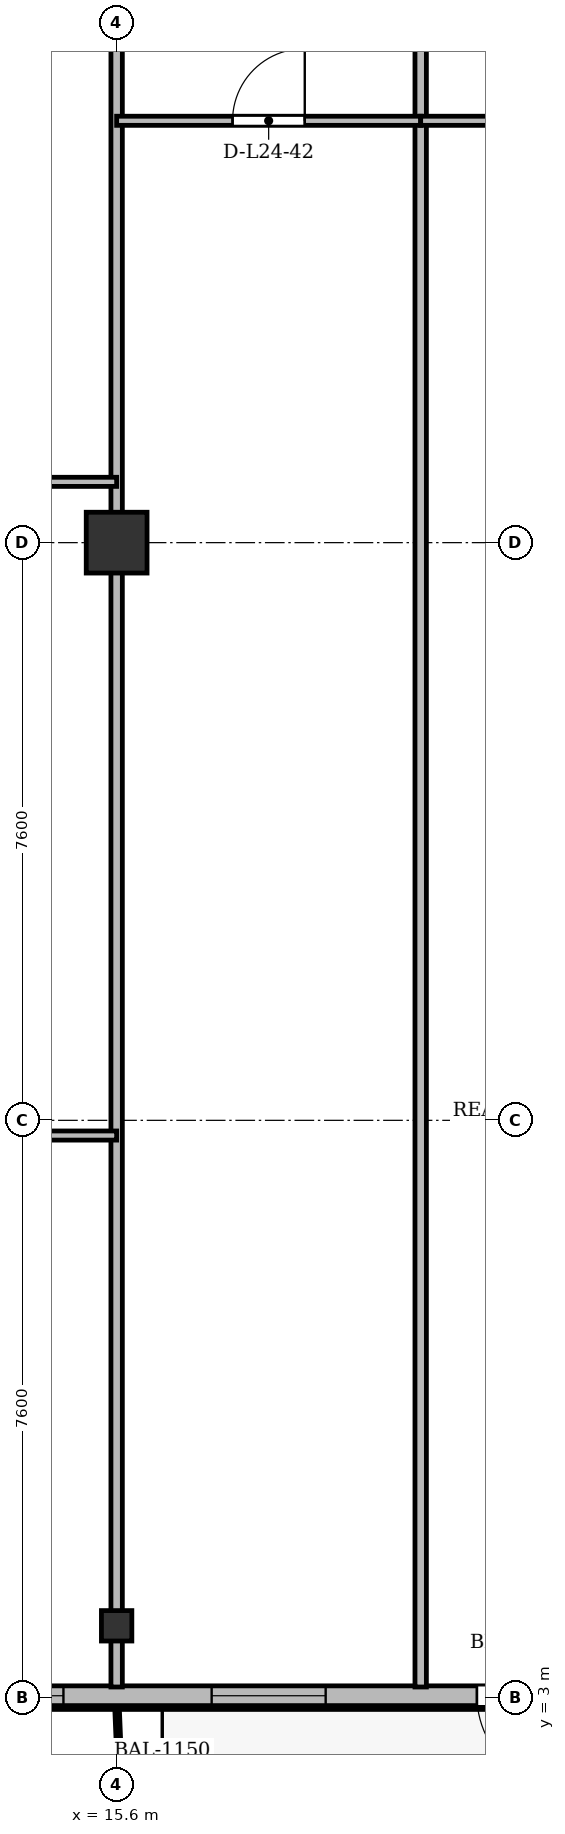
"""IFC4 building model, lengths in metres.
Left out: names, types, materials, properties, quantities, classifications, styles, units other than length and angle.
Written with IfcOpenShell. Run it as: python <this file> out.ifc"""

import sys

from ifc_helpers import new_model, si_unit, direction, frame, frame_2d, origin, origin_2d, place, context, subcontext, project, spatial, rectangle, i_section, extrude, source, transform, mapped, element, fill, save


model = new_model("IFC4")
c1 = context("Model", 3, precision=1e-05, world=origin(), true_north=direction((0.0, 1.0)))
c2 = subcontext(c1, "Body", "Model", "MODEL_VIEW")
j1 = project(units=[si_unit("LENGTHUNIT", "METRE"), si_unit("PLANEANGLEUNIT", "RADIAN")], contexts=[c1])
p1 = place(None, origin())
s1 = spatial("IfcSite", under=j1, at=p1, CompositionType="ELEMENT")
p2 = place(p1, origin())
s2 = spatial("IfcBuilding", under=s1, at=p2, CompositionType="ELEMENT")
p3 = place(p2, frame((0.0, 0.0, 96.1)))
s3 = spatial("IfcBuildingStorey", under=s2, at=p3, CompositionType="ELEMENT", Elevation=96.1)
m1 = source(origin(), c2, "Body", "SweptSolid", [
    extrude(i_section(OverallWidth=0.4, OverallDepth=0.4, WebThickness=0.022, FlangeThickness=0.035, at=origin_2d()), origin(), (0.0, 0.0, 1.0), 3.6),
])
p4 = place(p3, frame((15.6, 3.95, 0.0), z_axis=(0.0, 0.0, 1.0), x_axis=(1.0, 0.0, 0.0)))
e1 = element("IfcColumn", 1, at=p4, inside=s3, PredefinedType="COLUMN", context=c2, shape_type="MappedRepresentation", body=[
    mapped(m1, transform((0.0, 0.0, 0.0), x_axis=(1.0, 0.0, 0.0), y_axis=(0.0, 1.0, 0.0), z_axis=(0.0, 0.0, 1.0), scale=1.0)),
])
m2 = source(origin(), c2, "Body", "SweptSolid", [
    extrude(rectangle(XDim=0.8, YDim=0.8, at=origin_2d()), origin(), (0.0, 0.0, 1.0), 3.6),
])
p5 = place(p3, frame((15.6, 18.2, 0.0), z_axis=(0.0, 0.0, 1.0), x_axis=(1.0, 0.0, 0.0)))
e2 = element("IfcColumn", 2, at=p5, inside=s3, PredefinedType="COLUMN", context=c2, shape_type="MappedRepresentation", body=[
    mapped(m2, transform((0.0, 0.0, 0.0), x_axis=(1.0, 0.0, 0.0), y_axis=(0.0, 1.0, 0.0), z_axis=(0.0, 0.0, 1.0), scale=1.0)),
])
p6 = place(p3, frame((66.9, 3.03, 0.0), z_axis=(0.0, 0.0, 1.0), x_axis=(-1.0, 0.0, 0.0)))
e3 = element("IfcWall", 3, at=p6, inside=s3, PredefinedType="SOLIDWALL", context=c2, shape_type="SweptSolid", body=[
    extrude(rectangle(XDim=59.4, YDim=0.26, at=frame_2d((29.7, 0.0))), origin(), (0.0, 0.0, 1.0), 3.34),
])
p7 = place(p6, frame((2.1, 0.0, 0.9)))
e4 = element("IfcOpeningElement", 4, at=p7, cuts=e3, PredefinedType="OPENING", context=c2, shape_type="SweptSolid", body=[
    extrude(rectangle(XDim=1.8, YDim=1.8, at=frame_2d((0.9, 0.9))), frame((0.0, 0.14, 0.0), z_axis=(0.0, -1.0, 0.0), x_axis=(1.0, 0.0, 0.0)), (0.0, 0.0, 1.0), 0.28),
])
p8 = place(p6, frame((5.3, 0.0, 0.9)))
e5 = element("IfcOpeningElement", 5, at=p8, cuts=e3, PredefinedType="OPENING", context=c2, shape_type="SweptSolid", body=[
    extrude(rectangle(XDim=2.2, YDim=1.8, at=frame_2d((1.1, 0.9))), frame((0.0, 0.14, 0.0), z_axis=(0.0, -1.0, 0.0), x_axis=(1.0, 0.0, 0.0)), (0.0, 0.0, 1.0), 0.28),
])
p9 = place(p6, frame((8.65, 0.0, 0.9)))
e6 = element("IfcOpeningElement", 6, at=p9, cuts=e3, PredefinedType="OPENING", context=c2, shape_type="SweptSolid", body=[
    extrude(rectangle(XDim=1.5, YDim=1.75, at=frame_2d((0.75, 0.875))), frame((0.0, 0.14, 0.0), z_axis=(0.0, -1.0, 0.0), x_axis=(1.0, 0.0, 0.0)), (0.0, 0.0, 1.0), 0.28),
])
p10 = place(p6, frame((11.0, 0.0, 0.9)))
e7 = element("IfcOpeningElement", 7, at=p10, cuts=e3, PredefinedType="OPENING", context=c2, shape_type="SweptSolid", body=[
    extrude(rectangle(XDim=2.0, YDim=1.95, at=frame_2d((1.0, 0.975))), frame((0.0, 0.14, 0.0), z_axis=(0.0, -1.0, 0.0), x_axis=(1.0, 0.0, 0.0)), (0.0, 0.0, 1.0), 0.28),
])
p11 = place(p6, frame((13.775, 0.0, 0.9)))
e8 = element("IfcOpeningElement", 8, at=p11, cuts=e3, PredefinedType="OPENING", context=c2, shape_type="SweptSolid", body=[
    extrude(rectangle(XDim=1.65, YDim=1.85, at=frame_2d((0.825, 0.925))), frame((0.0, 0.14, 0.0), z_axis=(0.0, -1.0, 0.0), x_axis=(1.0, 0.0, 0.0)), (0.0, 0.0, 1.0), 0.28),
])
p12 = place(p6, frame((16.7, 0.0, 0.9)))
e9 = element("IfcOpeningElement", 9, at=p12, cuts=e3, PredefinedType="OPENING", context=c2, shape_type="SweptSolid", body=[
    extrude(rectangle(XDim=1.8, YDim=1.8, at=frame_2d((0.9, 0.9))), frame((0.0, 0.14, 0.0), z_axis=(0.0, -1.0, 0.0), x_axis=(1.0, 0.0, 0.0)), (0.0, 0.0, 1.0), 0.28),
])
p13 = place(p6, frame((20.227, 0.0, 0.0)))
e10 = element("IfcOpeningElement", 10, at=p13, cuts=e3, PredefinedType="OPENING", context=c2, shape_type="SweptSolid", body=[
    extrude(rectangle(XDim=1.2, YDim=2.2, at=frame_2d((0.6, 1.1))), frame((0.0, 0.14, 0.0), z_axis=(0.0, -1.0, 0.0), x_axis=(1.0, 0.0, 0.0)), (0.0, 0.0, 1.0), 0.28),
])
p14 = place(p6, frame((28.95, 0.0, 0.9)))
e11 = element("IfcOpeningElement", 11, at=p14, cuts=e3, PredefinedType="OPENING", context=c2, shape_type="SweptSolid", body=[
    extrude(rectangle(XDim=1.5, YDim=1.75, at=frame_2d((0.75, 0.875))), frame((0.0, 0.14, 0.0), z_axis=(0.0, -1.0, 0.0), x_axis=(1.0, 0.0, 0.0)), (0.0, 0.0, 1.0), 0.28),
])
p15 = place(p6, frame((36.5, 0.0, 0.9)))
e12 = element("IfcOpeningElement", 12, at=p15, cuts=e3, PredefinedType="OPENING", context=c2, shape_type="SweptSolid", body=[
    extrude(rectangle(XDim=2.0, YDim=1.95, at=frame_2d((1.0, 0.975))), frame((0.0, 0.14, 0.0), z_axis=(0.0, -1.0, 0.0), x_axis=(1.0, 0.0, 0.0)), (0.0, 0.0, 1.0), 0.28),
])
p16 = place(p6, frame((39.075, 0.0, 0.9)))
e13 = element("IfcOpeningElement", 13, at=p16, cuts=e3, PredefinedType="OPENING", context=c2, shape_type="SweptSolid", body=[
    extrude(rectangle(XDim=1.65, YDim=1.85, at=frame_2d((0.825, 0.925))), frame((0.0, 0.14, 0.0), z_axis=(0.0, -1.0, 0.0), x_axis=(1.0, 0.0, 0.0)), (0.0, 0.0, 1.0), 0.28),
])
p17 = place(p6, frame((41.4, 0.0, 0.9)))
e14 = element("IfcOpeningElement", 14, at=p17, cuts=e3, PredefinedType="OPENING", context=c2, shape_type="SweptSolid", body=[
    extrude(rectangle(XDim=1.8, YDim=1.8, at=frame_2d((0.9, 0.9))), frame((0.0, 0.14, 0.0), z_axis=(0.0, -1.0, 0.0), x_axis=(1.0, 0.0, 0.0)), (0.0, 0.0, 1.0), 0.28),
])
p18 = place(p6, frame((45.36, 0.0, 0.0)))
e15 = element("IfcOpeningElement", 15, at=p18, cuts=e3, PredefinedType="OPENING", context=c2, shape_type="SweptSolid", body=[
    extrude(rectangle(XDim=1.2, YDim=2.2, at=frame_2d((0.6, 1.1))), frame((0.0, 0.14, 0.0), z_axis=(0.0, -1.0, 0.0), x_axis=(1.0, 0.0, 0.0)), (0.0, 0.0, 1.0), 0.28),
])
p19 = place(p6, frame((48.55, 0.0, 0.9)))
e16 = element("IfcOpeningElement", 16, at=p19, cuts=e3, PredefinedType="OPENING", context=c2, shape_type="SweptSolid", body=[
    extrude(rectangle(XDim=1.5, YDim=1.75, at=frame_2d((0.75, 0.875))), frame((0.0, 0.14, 0.0), z_axis=(0.0, -1.0, 0.0), x_axis=(1.0, 0.0, 0.0)), (0.0, 0.0, 1.0), 0.28),
])
p20 = place(p6, frame((52.0, 0.0, 0.9)))
e17 = element("IfcOpeningElement", 17, at=p20, cuts=e3, PredefinedType="OPENING", context=c2, shape_type="SweptSolid", body=[
    extrude(rectangle(XDim=2.0, YDim=1.95, at=frame_2d((1.0, 0.975))), frame((0.0, 0.14, 0.0), z_axis=(0.0, -1.0, 0.0), x_axis=(1.0, 0.0, 0.0)), (0.0, 0.0, 1.0), 0.28),
])
p21 = place(p6, frame((55.575, 0.0, 0.9)))
e18 = element("IfcOpeningElement", 18, at=p21, cuts=e3, PredefinedType="OPENING", context=c2, shape_type="SweptSolid", body=[
    extrude(rectangle(XDim=1.65, YDim=1.85, at=frame_2d((0.825, 0.925))), frame((0.0, 0.14, 0.0), z_axis=(0.0, -1.0, 0.0), x_axis=(1.0, 0.0, 0.0)), (0.0, 0.0, 1.0), 0.28),
])
p22 = place(p3, frame((15.6, 3.145, 0.0), z_axis=(0.0, 0.0, 1.0), x_axis=(0.0, 1.0, 0.0)))
e19 = element("IfcWall", 19, at=p22, inside=s3, PredefinedType="PARTITIONING", context=c2, shape_type="SweptSolid", body=[
    extrude(rectangle(XDim=24.455, YDim=0.15, at=frame_2d((12.228, 0.0))), origin(), (0.0, 0.0, 1.0), 2.84),
])
p23 = place(p3, frame((19.6, 3.145, 0.0), z_axis=(0.0, 0.0, 1.0), x_axis=(0.0, 1.0, 0.0)))
e20 = element("IfcWall", 20, at=p23, inside=s3, PredefinedType="PARTITIONING", context=c2, shape_type="SweptSolid", body=[
    extrude(rectangle(XDim=24.455, YDim=0.15, at=frame_2d((12.228, 0.0))), origin(), (0.0, 0.0, 1.0), 2.752),
])
p24 = place(p3, frame((8.8, 19.0, 0.0), z_axis=(0.0, 0.0, 1.0), x_axis=(1.0, 0.0, 0.0)))
e21 = element("IfcWall", 21, at=p24, inside=s3, PredefinedType="PARTITIONING", context=c2, shape_type="SweptSolid", body=[
    extrude(rectangle(XDim=6.8, YDim=0.12, at=frame_2d((3.4, 0.0))), origin(), (0.0, 0.0, 1.0), 2.84),
])
p25 = place(p24, frame((2.925, 0.0, 0.0)))
e22 = element("IfcOpeningElement", 22, at=p25, cuts=e21, PredefinedType="OPENING", context=c2, shape_type="SweptSolid", body=[
    extrude(rectangle(XDim=0.95, YDim=2.15, at=frame_2d((0.475, 1.075))), frame((0.0, 0.07, 0.0), z_axis=(0.0, -1.0, 0.0), x_axis=(1.0, 0.0, 0.0)), (0.0, 0.0, 1.0), 0.14),
])
p26 = place(p3, frame((12.2, 10.4, 0.0), z_axis=(0.0, 0.0, 1.0), x_axis=(1.0, 0.0, 0.0)))
e23 = element("IfcWall", 23, at=p26, inside=s3, PredefinedType="PARTITIONING", context=c2, shape_type="SweptSolid", body=[
    extrude(rectangle(XDim=3.4, YDim=0.12, at=frame_2d((1.7, 0.0))), origin(), (0.0, 0.0, 1.0), 2.84),
])
p27 = place(p26, frame((1.131, 0.0, 0.0)))
e24 = element("IfcOpeningElement", 24, at=p27, cuts=e23, PredefinedType="OPENING", context=c2, shape_type="SweptSolid", body=[
    extrude(rectangle(XDim=0.95, YDim=2.15, at=frame_2d((0.475, 1.075))), frame((0.0, 0.07, 0.0), z_axis=(0.0, -1.0, 0.0), x_axis=(1.0, 0.0, 0.0)), (0.0, 0.0, 1.0), 0.14),
])
p28 = place(p3, frame((15.6, 23.75, 0.0), z_axis=(0.0, 0.0, 1.0), x_axis=(1.0, 0.0, 0.0)))
e25 = element("IfcWall", 25, at=p28, inside=s3, PredefinedType="PARTITIONING", context=c2, shape_type="SweptSolid", body=[
    extrude(rectangle(XDim=4.0, YDim=0.12, at=frame_2d((2.0, 0.0))), origin(), (0.0, 0.0, 1.0), 2.84),
])
p29 = place(p28, frame((1.525, 0.0, 0.0)))
e26 = element("IfcOpeningElement", 26, at=p29, cuts=e25, PredefinedType="OPENING", context=c2, shape_type="SweptSolid", body=[
    extrude(rectangle(XDim=0.95, YDim=2.15, at=frame_2d((0.475, 1.075))), frame((0.0, 0.07, 0.0), z_axis=(0.0, -1.0, 0.0), x_axis=(1.0, 0.0, 0.0)), (0.0, 0.0, 1.0), 0.14),
])
p30 = place(p3, frame((19.6, 23.75, 0.0), z_axis=(0.0, 0.0, 1.0), x_axis=(1.0, 0.0, 0.0)))
e27 = element("IfcWall", 27, at=p30, inside=s3, PredefinedType="PARTITIONING", context=c2, shape_type="SweptSolid", body=[
    extrude(rectangle(XDim=3.8, YDim=0.12, at=frame_2d((1.9, 0.0))), origin(), (0.0, 0.0, 1.0), 2.84),
])
p31 = place(p30, frame((1.33, 0.0, 0.0)))
e28 = element("IfcOpeningElement", 28, at=p31, cuts=e27, PredefinedType="OPENING", context=c2, shape_type="SweptSolid", body=[
    extrude(rectangle(XDim=0.95, YDim=2.15, at=frame_2d((0.475, 1.075))), frame((0.0, 0.07, 0.0), z_axis=(0.0, -1.0, 0.0), x_axis=(1.0, 0.0, 0.0)), (0.0, 0.0, 1.0), 0.14),
])
m3 = source(origin(), c2, "Body", "SweptSolid", [
    extrude(rectangle(XDim=1.2, YDim=2.2, at=frame_2d((0.6, 1.1))), frame((0.0, 0.025, 0.0), z_axis=(0.0, -1.0, 0.0), x_axis=(1.0, 0.0, 0.0)), (0.0, 0.0, 1.0), 0.05),
])
p32 = place(p18, origin())
e29 = element("IfcDoor", 29, at=p32, inside=s3, OperationType="SINGLE_SWING_LEFT", PredefinedType="DOOR", context=c2, shape_type="MappedRepresentation", body=[
    mapped(m3, transform((0.0, 0.0, 0.0), x_axis=(1.0, 0.0, 0.0), y_axis=(0.0, 1.0, 0.0), z_axis=(0.0, 0.0, 1.0), scale=1.0)),
])
fill(e15, e29)
m4 = source(origin(), c2, "Body", "SweptSolid", [
    extrude(rectangle(XDim=1.5, YDim=1.75, at=frame_2d((0.75, 0.875))), frame((0.0, 0.03, 0.0), z_axis=(0.0, -1.0, 0.0), x_axis=(1.0, 0.0, 0.0)), (0.0, 0.0, 1.0), 0.06),
])
p33 = place(p19, origin())
e30 = element("IfcWindow", 30, at=p33, inside=s3, PartitioningType="SINGLE_PANEL", PredefinedType="WINDOW", context=c2, shape_type="MappedRepresentation", body=[
    mapped(m4, transform((0.0, 0.0, 0.0), x_axis=(1.0, 0.0, 0.0), y_axis=(0.0, 1.0, 0.0), z_axis=(0.0, 0.0, 1.0), scale=1.0)),
])
fill(e16, e30)
m5 = source(origin(), c2, "Body", "SweptSolid", [
    extrude(rectangle(XDim=2.0, YDim=1.95, at=frame_2d((1.0, 0.975))), frame((0.0, 0.03, 0.0), z_axis=(0.0, -1.0, 0.0), x_axis=(1.0, 0.0, 0.0)), (0.0, 0.0, 1.0), 0.06),
])
p34 = place(p20, origin())
e31 = element("IfcWindow", 31, at=p34, inside=s3, PartitioningType="SINGLE_PANEL", PredefinedType="WINDOW", context=c2, shape_type="MappedRepresentation", body=[
    mapped(m5, transform((0.0, 0.0, 0.0), x_axis=(1.0, 0.0, 0.0), y_axis=(0.0, 1.0, 0.0), z_axis=(0.0, 0.0, 1.0), scale=1.0)),
])
fill(e17, e31)
m6 = source(origin(), c2, "Body", "SweptSolid", [
    extrude(rectangle(XDim=0.95, YDim=2.15, at=frame_2d((0.475, 1.075))), frame((0.0, 0.025, 0.0), z_axis=(0.0, -1.0, 0.0), x_axis=(1.0, 0.0, 0.0)), (0.0, 0.0, 1.0), 0.05),
])
p35 = place(p29, origin())
e32 = element("IfcDoor", 32, at=p35, inside=s3, OperationType="SINGLE_SWING_RIGHT", PredefinedType="DOOR", context=c2, shape_type="MappedRepresentation", body=[
    mapped(m6, transform((0.0, 0.0, 0.0), x_axis=(1.0, 0.0, 0.0), y_axis=(0.0, 1.0, 0.0), z_axis=(0.0, 0.0, 1.0), scale=1.0)),
])
fill(e26, e32)
save(model, sys.argv[1])
